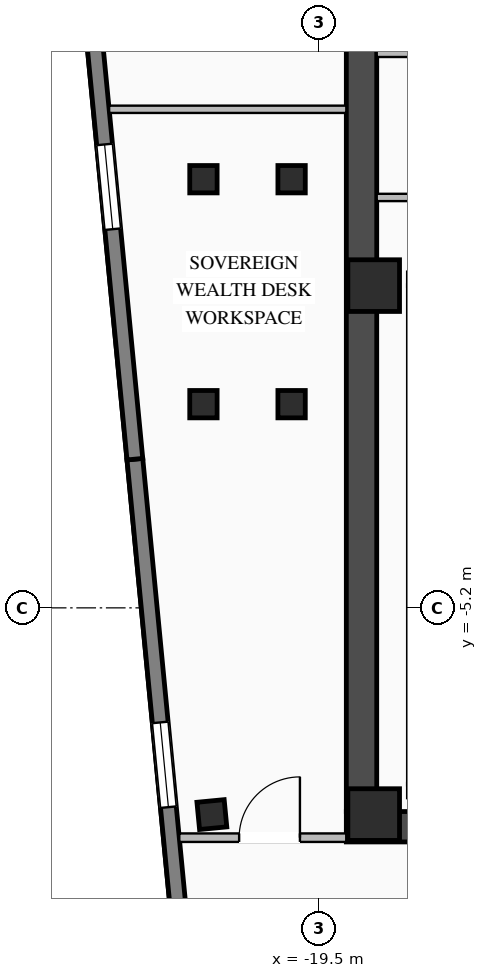
"""IFC4 building model, lengths in metres.
Left out: names, types, materials, properties, quantities, classifications, styles, units other than length and angle.
Written with IfcOpenShell. Run it as: python <this file> out.ifc"""

import sys

from ifc_helpers import new_model, si_unit, direction, frame, frame_2d, origin, origin_2d, place, context, subcontext, project, spatial, rectangle, i_section, extrude, element, fill, save


model = new_model("IFC4")
c1 = context("Model", 3, precision=1e-05, world=origin(), true_north=direction((0.0, 1.0)))
c2 = subcontext(c1, "Body", "Model", "MODEL_VIEW")
j1 = project(units=[si_unit("LENGTHUNIT", "METRE"), si_unit("PLANEANGLEUNIT", "RADIAN")], contexts=[c1])
p1 = place(None, origin())
s1 = spatial("IfcSite", under=j1, at=p1, CompositionType="ELEMENT")
p2 = place(p1, origin())
s2 = spatial("IfcBuilding", under=s1, at=p2, CompositionType="ELEMENT")
p3 = place(p2, frame((0.0, 0.0, 251.7)))
s3 = spatial("IfcBuildingStorey", under=s2, at=p3, CompositionType="ELEMENT", Elevation=251.7)
p4 = place(p3, frame((-19.05, -8.8, 0.0), z_axis=(0.0, 0.0, 1.0), x_axis=(1.0, 0.0, 0.0)))
e1 = element("IfcWall", 1, at=p4, inside=s3, PredefinedType="SHEAR", context=c2, shape_type="SweptSolid", body=[
    extrude(rectangle(XDim=10.25, YDim=0.5, at=frame_2d((5.125, 0.0))), origin(), (0.0, 0.0, 1.0), 3.27),
])
p5 = place(p3, frame((-18.8, -8.55, 0.0), z_axis=(0.0, 0.0, 1.0), x_axis=(0.0, 1.0, 0.0)))
e2 = element("IfcWall", 2, at=p5, inside=s3, PredefinedType="SHEAR", context=c2, shape_type="SweptSolid", body=[
    extrude(rectangle(XDim=17.1, YDim=0.5, at=frame_2d((8.55, 0.0))), origin(), (0.0, 0.0, 1.0), 3.27),
])
for number, where, z_axis, x_axis in (
    (3, (-18.6, -8.6, 0.0), (0.0, 0.0, 1.0), (1.0, 0.0, 0.0)),
    (4, (-18.6, 0.1, 0.0), (0.0, 0.0, 1.0), (1.0, 0.0, 0.0)),
):
    element("IfcColumn", number, at=place(p3, frame(where, z_axis=z_axis, x_axis=x_axis)), inside=s3, PredefinedType="COLUMN", context=c2, shape_type="SweptSolid", body=[
        extrude(rectangle(XDim=0.85, YDim=0.85, at=origin_2d()), origin(), (0.0, 0.0, 1.0), 3.45),
    ])
for number, where, z_axis, x_axis in (
    (5, (-21.4, -1.85, 0.0), (0.0, 0.0, 1.0), (1.0, 0.0, 0.0)),
    (6, (-21.4, 1.85, 0.0), (0.0, 0.0, 1.0), (1.0, 0.0, 0.0)),
    (7, (-19.95, -1.85, 0.0), (0.0, 0.0, 1.0), (1.0, 0.0, 0.0)),
    (8, (-19.95, 1.85, 0.0), (0.0, 0.0, 1.0), (1.0, 0.0, 0.0)),
    (9, (-21.261, -8.6, 0.0), (0.0, 0.0, 1.0), (0.995, 0.096, 0.0)),
):
    element("IfcColumn", number, at=place(p3, frame(where, z_axis=z_axis, x_axis=x_axis)), inside=s3, PredefinedType="COLUMN", context=c2, shape_type="SweptSolid", body=[
        extrude(i_section(OverallWidth=0.45, OverallDepth=0.45, WebThickness=0.022, FlangeThickness=0.032, at=origin_2d()), origin(), (0.0, 0.0, 1.0), 3.45),
    ])
p6 = place(p3, frame((-21.075, -17.834, 0.0), z_axis=(0.0, 0.0, 1.0), x_axis=(-0.095852427869, 0.995395555582, 0.0)))
e10 = element("IfcWall", 10, at=p6, inside=s3, PredefinedType="STANDARD", context=c2, shape_type="SweptSolid", body=[
    extrude(rectangle(XDim=15.15, YDim=0.26, at=frame_2d((7.575, 0.0))), origin(), (0.0, 0.0, 1.0), 2.645),
])
p7 = place(p6, frame((4.35, 0.0, 0.535)))
e11 = element("IfcOpeningElement", 11, at=p7, cuts=e10, PredefinedType="OPENING", context=c2, shape_type="SweptSolid", body=[
    extrude(rectangle(XDim=1.4, YDim=1.95, at=frame_2d((0.7, 0.975))), frame((0.0, 0.14, 0.0), z_axis=(0.0, -1.0, 0.0), x_axis=(1.0, 0.0, 0.0)), (0.0, 0.0, 1.0), 0.28),
])
p8 = place(p6, frame((9.4, 0.0, 0.535)))
e12 = element("IfcOpeningElement", 12, at=p8, cuts=e10, PredefinedType="OPENING", context=c2, shape_type="SweptSolid", body=[
    extrude(rectangle(XDim=1.4, YDim=1.95, at=frame_2d((0.7, 0.975))), frame((0.0, 0.14, 0.0), z_axis=(0.0, -1.0, 0.0), x_axis=(1.0, 0.0, 0.0)), (0.0, 0.0, 1.0), 0.28),
])
p9 = place(p3, frame((-22.527, -2.754, 0.0), z_axis=(0.0, 0.0, 1.0), x_axis=(-0.095850890337, 0.995395703638, 0.0)))
e13 = element("IfcWall", 13, at=p9, inside=s3, PredefinedType="STANDARD", context=c2, shape_type="SweptSolid", body=[
    extrude(rectangle(XDim=15.15, YDim=0.26, at=frame_2d((7.575, 0.0))), origin(), (0.0, 0.0, 1.0), 3.25),
])
p10 = place(p9, frame((3.8, 0.0, 0.76)))
e14 = element("IfcOpeningElement", 14, at=p10, cuts=e13, PredefinedType="OPENING", context=c2, shape_type="SweptSolid", body=[
    extrude(rectangle(XDim=1.4, YDim=1.95, at=frame_2d((0.7, 0.975))), frame((0.0, 0.14, 0.0), z_axis=(0.0, -1.0, 0.0), x_axis=(1.0, 0.0, 0.0)), (0.0, 0.0, 1.0), 0.28),
])
p11 = place(p9, frame((9.4, 0.0, 0.76)))
e15 = element("IfcOpeningElement", 15, at=p11, cuts=e13, PredefinedType="OPENING", context=c2, shape_type="SweptSolid", body=[
    extrude(rectangle(XDim=1.4, YDim=1.95, at=frame_2d((0.7, 0.975))), frame((0.0, 0.14, 0.0), z_axis=(0.0, -1.0, 0.0), x_axis=(1.0, 0.0, 0.0)), (0.0, 0.0, 1.0), 0.28),
])
for number, where, z_axis, x_axis in (
    (16, (-18.55, 3.92, 0.0), (0.0, 0.0, 1.0), (1.0, 0.0, 0.0)),
    (17, (-18.55, 1.55, 0.0), (0.0, 0.0, 1.0), (1.0, 0.0, 0.0)),
):
    element("IfcWall", number, at=place(p3, frame(where, z_axis=z_axis, x_axis=x_axis)), inside=s3, PredefinedType="STANDARD", context=c2, shape_type="SweptSolid", body=[
        extrude(rectangle(XDim=4.65, YDim=0.12, at=frame_2d((2.325, 0.0))), origin(), (0.0, 0.0, 1.0), 3.25),
    ])
p12 = place(p3, frame((-21.797, -8.98, 0.0), z_axis=(0.0, 0.0, 1.0), x_axis=(1.0, 0.0, 0.0)))
e18 = element("IfcWall", 18, at=p12, inside=s3, PredefinedType="STANDARD", context=c2, shape_type="SweptSolid", body=[
    extrude(rectangle(XDim=2.747, YDim=0.14, at=frame_2d((1.374, 0.0))), origin(), (0.0, 0.0, 1.0), 3.25),
])
p13 = place(p12, frame((0.984, 0.0, 0.0)))
e19 = element("IfcOpeningElement", 19, at=p13, cuts=e18, PredefinedType="OPENING", context=c2, shape_type="SweptSolid", body=[
    extrude(rectangle(XDim=1.0, YDim=2.08, at=frame_2d((0.5, 1.04))), frame((0.0, 0.08, 0.0), z_axis=(0.0, -1.0, 0.0), x_axis=(1.0, 0.0, 0.0)), (0.0, 0.0, 1.0), 0.16),
])
p14 = place(p3, frame((-22.951, 3.0, 0.0), z_axis=(0.0, 0.0, 1.0), x_axis=(1.0, 0.0, 0.0)))
e20 = element("IfcWall", 20, at=p14, inside=s3, PredefinedType="STANDARD", context=c2, shape_type="SweptSolid", body=[
    extrude(rectangle(XDim=3.901, YDim=0.12, at=frame_2d((1.95, 0.0))), origin(), (0.0, 0.0, 1.0), 3.25),
])
p15 = place(p8, origin())
e21 = element("IfcWindow", 21, at=p15, inside=s3, PartitioningType="SINGLE_PANEL", PredefinedType="WINDOW", context=c2, shape_type="SweptSolid", body=[
    extrude(rectangle(XDim=1.4, YDim=1.95, at=frame_2d((0.7, 0.975))), frame((0.0, 0.03, 0.0), z_axis=(0.0, -1.0, 0.0), x_axis=(1.0, 0.0, 0.0)), (0.0, 0.0, 1.0), 0.06),
])
fill(e12, e21)
p16 = place(p10, origin())
e22 = element("IfcWindow", 22, at=p16, inside=s3, PartitioningType="SINGLE_PANEL", PredefinedType="WINDOW", context=c2, shape_type="SweptSolid", body=[
    extrude(rectangle(XDim=1.4, YDim=1.95, at=frame_2d((0.7, 0.975))), frame((0.0, 0.03, 0.0), z_axis=(0.0, -1.0, 0.0), x_axis=(1.0, 0.0, 0.0)), (0.0, 0.0, 1.0), 0.06),
])
fill(e14, e22)
p17 = place(p13, origin())
e23 = element("IfcDoor", 23, at=p17, inside=s3, OperationType="SINGLE_SWING_RIGHT", PredefinedType="DOOR", context=c2, shape_type="SweptSolid", body=[
    extrude(rectangle(XDim=1.0, YDim=2.08, at=frame_2d((0.5, 1.04))), frame((0.0, 0.025, 0.0), z_axis=(0.0, -1.0, 0.0), x_axis=(1.0, 0.0, 0.0)), (0.0, 0.0, 1.0), 0.05),
])
fill(e19, e23)
save(model, sys.argv[1])
